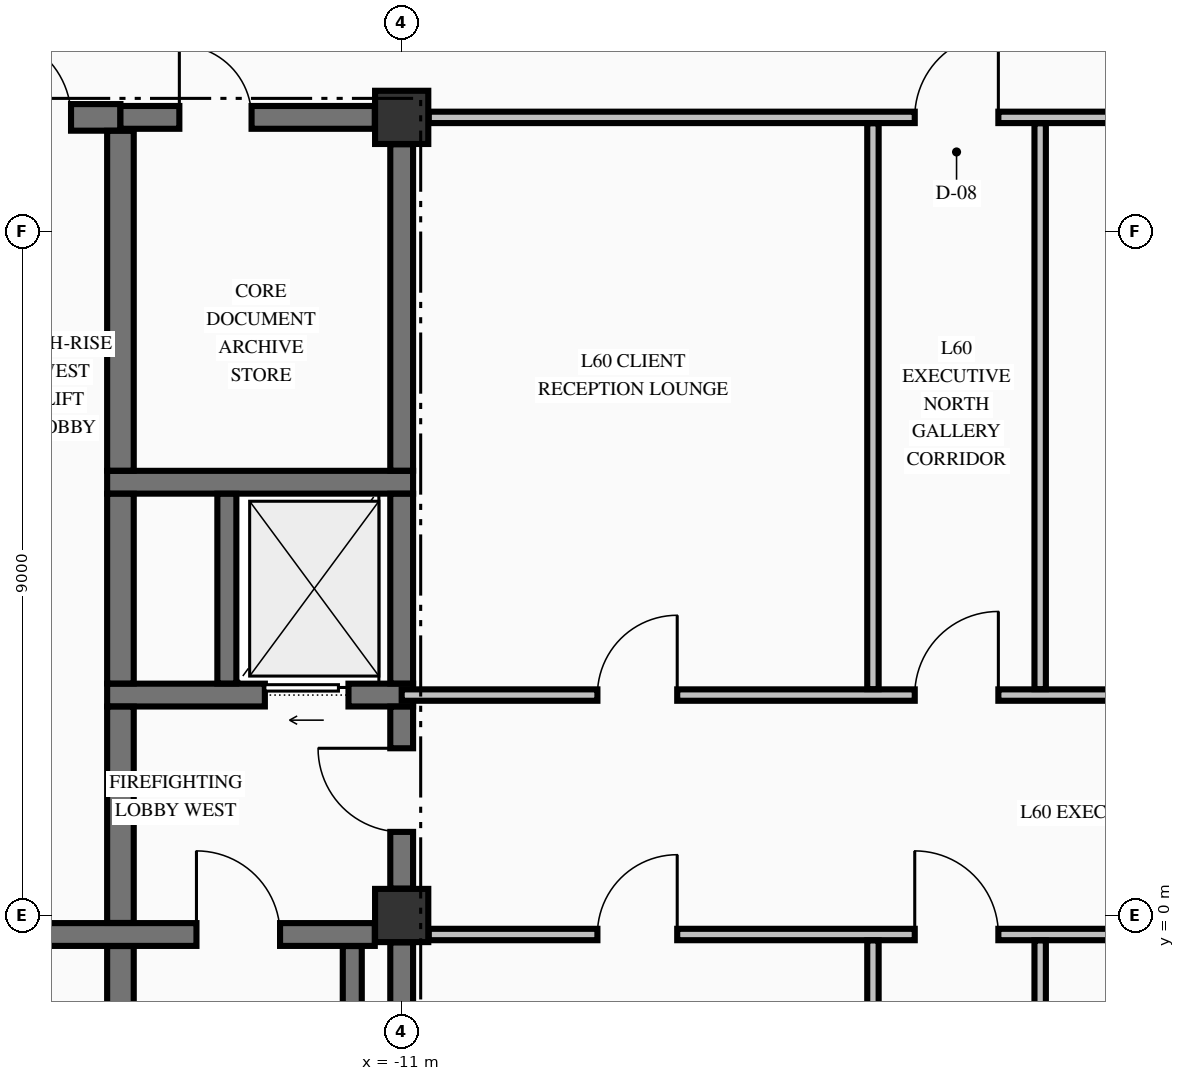
"""IFC4 building model, lengths in metres.
Left out: names, types, materials, properties, quantities, classifications, styles, units other than length and angle.
Written with IfcOpenShell. Run it as: python <this file> out.ifc"""

import sys

from ifc_helpers import new_model, si_unit, direction, frame, frame_2d, origin, origin_2d, place, context, subcontext, project, spatial, rectangle, extrude, element, fill, save


model = new_model("IFC4")
c1 = context("Model", 3, precision=1e-05, world=origin(), true_north=direction((0.0, 1.0)))
c2 = subcontext(c1, "Body", "Model", "MODEL_VIEW")
j1 = project(units=[si_unit("LENGTHUNIT", "METRE"), si_unit("PLANEANGLEUNIT", "RADIAN")], contexts=[c1])
p1 = place(None, origin())
s1 = spatial("IfcSite", under=j1, at=p1, CompositionType="ELEMENT")
p2 = place(p1, origin())
s2 = spatial("IfcBuilding", under=s1, at=p2, CompositionType="ELEMENT")
p3 = place(p2, frame((0.0, 0.0, 230.05)))
s3 = spatial("IfcBuildingStorey", under=s2, at=p3, CompositionType="ELEMENT", Elevation=230.05)
for number, where, z_axis, x_axis in (
    (1, (-11.0, 0.0, -0.25), (0.0, 0.0, 1.0), (1.0, 0.0, 0.0)),
    (2, (-11.0, 10.5, -0.25), (0.0, 0.0, 1.0), (1.0, 0.0, 0.0)),
):
    element("IfcColumn", number, at=place(p3, frame(where, z_axis=z_axis, x_axis=x_axis)), inside=s3, PredefinedType="COLUMN", context=c2, shape_type="SweptSolid", body=[
        extrude(rectangle(XDim=0.7, YDim=0.7, at=origin_2d()), origin(), (0.0, 0.0, 1.0), 3.23),
    ])
p4 = place(p3, frame((-20.571, -0.25, 0.0), z_axis=(0.0, 0.0, 1.0), x_axis=(1.0, 0.0, 0.0)))
e3 = element("IfcWall", 3, at=p4, inside=s3, PredefinedType="SHEAR", context=c2, shape_type="SweptSolid", body=[
    extrude(rectangle(XDim=9.217, YDim=0.3, at=frame_2d((4.608, 0.0))), origin(), (0.0, 0.0, 1.0), 2.98),
])
p5 = place(p4, frame((6.871, 0.0, 0.0)))
e4 = element("IfcOpeningElement", 4, at=p5, cuts=e3, PredefinedType="OPENING", context=c2, shape_type="SweptSolid", body=[
    extrude(rectangle(XDim=1.1, YDim=2.15, at=frame_2d((0.55, 1.075))), frame((0.0, 0.16, 0.0), z_axis=(0.0, -1.0, 0.0), x_axis=(1.0, 0.0, 0.0)), (0.0, 0.0, 1.0), 0.32),
])
p6 = place(p3, frame((-14.875, 2.9, 0.0), z_axis=(0.0, 0.0, 1.0), x_axis=(1.0, 0.0, 0.0)))
e5 = element("IfcWall", 5, at=p6, inside=s3, PredefinedType="SHEAR", context=c2, shape_type="SweptSolid", body=[
    extrude(rectangle(XDim=4.025, YDim=0.3, at=frame_2d((2.012, 0.0))), origin(), (0.0, 0.0, 1.0), 2.98),
])
p7 = place(p6, frame((2.075, 0.0, 0.0)))
e6 = element("IfcOpeningElement", 6, at=p7, cuts=e5, PredefinedType="OPENING", context=c2, shape_type="SweptSolid", body=[
    extrude(rectangle(XDim=1.1, YDim=2.2, at=frame_2d((0.55, 1.1))), frame((0.0, 0.16, 0.0), z_axis=(0.0, -1.0, 0.0), x_axis=(1.0, 0.0, 0.0)), (0.0, 0.0, 1.0), 0.32),
])
p8 = place(p3, frame((-14.875, 5.7, 0.0), z_axis=(0.0, 0.0, 1.0), x_axis=(1.0, 0.0, 0.0)))
e7 = element("IfcWall", 7, at=p8, inside=s3, PredefinedType="SHEAR", context=c2, shape_type="SweptSolid", body=[
    extrude(rectangle(XDim=4.025, YDim=0.3, at=frame_2d((2.012, 0.0))), origin(), (0.0, 0.0, 1.0), 2.98),
])
p9 = place(p3, frame((-19.646, 10.5, 0.0), z_axis=(0.0, 0.0, 1.0), x_axis=(1.0, 0.0, 0.0)))
e8 = element("IfcWall", 8, at=p9, inside=s3, PredefinedType="SHEAR", context=c2, shape_type="SweptSolid", body=[
    extrude(rectangle(XDim=4.946, YDim=0.35, at=frame_2d((2.473, 0.0))), origin(), (0.0, 0.0, 1.0), 2.98),
])
p10 = place(p9, frame((3.196, 0.0, 0.0)))
e9 = element("IfcOpeningElement", 9, at=p10, cuts=e8, PredefinedType="OPENING", context=c2, shape_type="SweptSolid", body=[
    extrude(rectangle(XDim=1.1, YDim=2.15, at=frame_2d((0.55, 1.075))), frame((0.0, 0.185, 0.0), z_axis=(0.0, -1.0, 0.0), x_axis=(1.0, 0.0, 0.0)), (0.0, 0.0, 1.0), 0.37),
])
p11 = place(p3, frame((-14.7, 10.5, 0.0), z_axis=(0.0, 0.0, 1.0), x_axis=(1.0, 0.0, 0.0)))
e10 = element("IfcWall", 10, at=p11, inside=s3, PredefinedType="SHEAR", context=c2, shape_type="SweptSolid", body=[
    extrude(rectangle(XDim=3.346, YDim=0.3, at=frame_2d((1.673, 0.0))), origin(), (0.0, 0.0, 1.0), 2.98),
])
p12 = place(p11, frame((0.775, 0.0, 0.0)))
e11 = element("IfcOpeningElement", 11, at=p12, cuts=e10, PredefinedType="OPENING", context=c2, shape_type="SweptSolid", body=[
    extrude(rectangle(XDim=0.95, YDim=2.15, at=frame_2d((0.475, 1.075))), frame((0.0, 0.16, 0.0), z_axis=(0.0, -1.0, 0.0), x_axis=(1.0, 0.0, 0.0)), (0.0, 0.0, 1.0), 0.32),
])
p13 = place(p3, frame((-10.644, -0.25, 0.0), z_axis=(0.0, 0.0, 1.0), x_axis=(1.0, 0.0, 0.0)))
e12 = element("IfcWall", 12, at=p13, inside=s3, PredefinedType="PARTITIONING", context=c2, shape_type="SweptSolid", body=[
    extrude(rectangle(XDim=21.288, YDim=0.15, at=frame_2d((10.644, 0.0))), origin(), (0.0, 0.0, 1.0), 2.98),
])
p14 = place(p13, frame((6.394, 0.0, 0.0)))
e13 = element("IfcOpeningElement", 13, at=p14, cuts=e12, PredefinedType="OPENING", context=c2, shape_type="SweptSolid", body=[
    extrude(rectangle(XDim=1.1, YDim=2.15, at=frame_2d((0.55, 1.075))), frame((0.0, 0.085, 0.0), z_axis=(0.0, -1.0, 0.0), x_axis=(1.0, 0.0, 0.0)), (0.0, 0.0, 1.0), 0.17),
])
p15 = place(p13, frame((2.219, 0.0, 0.0)))
e14 = element("IfcOpeningElement", 14, at=p15, cuts=e12, PredefinedType="OPENING", context=c2, shape_type="SweptSolid", body=[
    extrude(rectangle(XDim=1.05, YDim=2.15, at=frame_2d((0.525, 1.075))), frame((0.0, 0.085, 0.0), z_axis=(0.0, -1.0, 0.0), x_axis=(1.0, 0.0, 0.0)), (0.0, 0.0, 1.0), 0.17),
])
p16 = place(p13, frame((14.369, 0.0, 0.0)))
e15 = element("IfcOpeningElement", 15, at=p16, cuts=e12, PredefinedType="OPENING", context=c2, shape_type="SweptSolid", body=[
    extrude(rectangle(XDim=0.95, YDim=2.15, at=frame_2d((0.475, 1.075))), frame((0.0, 0.085, 0.0), z_axis=(0.0, -1.0, 0.0), x_axis=(1.0, 0.0, 0.0)), (0.0, 0.0, 1.0), 0.17),
])
p17 = place(p3, frame((-11.0, 2.9, 0.0), z_axis=(0.0, 0.0, 1.0), x_axis=(1.0, 0.0, 0.0)))
e16 = element("IfcWall", 16, at=p17, inside=s3, PredefinedType="PARTITIONING", context=c2, shape_type="SweptSolid", body=[
    extrude(rectangle(XDim=22.0, YDim=0.15, at=frame_2d((11.0, 0.0))), origin(), (0.0, 0.0, 1.0), 2.98),
])
p18 = place(p17, frame((6.75, 0.0, 0.0)))
e17 = element("IfcOpeningElement", 17, at=p18, cuts=e16, PredefinedType="OPENING", context=c2, shape_type="SweptSolid", body=[
    extrude(rectangle(XDim=1.1, YDim=2.15, at=frame_2d((0.55, 1.075))), frame((0.0, 0.085, 0.0), z_axis=(0.0, -1.0, 0.0), x_axis=(1.0, 0.0, 0.0)), (0.0, 0.0, 1.0), 0.17),
])
p19 = place(p17, frame((2.575, 0.0, 0.0)))
e18 = element("IfcOpeningElement", 18, at=p19, cuts=e16, PredefinedType="OPENING", context=c2, shape_type="SweptSolid", body=[
    extrude(rectangle(XDim=1.05, YDim=2.15, at=frame_2d((0.525, 1.075))), frame((0.0, 0.085, 0.0), z_axis=(0.0, -1.0, 0.0), x_axis=(1.0, 0.0, 0.0)), (0.0, 0.0, 1.0), 0.17),
])
p20 = place(p17, frame((14.65, 0.0, 0.0)))
e19 = element("IfcOpeningElement", 19, at=p20, cuts=e16, PredefinedType="OPENING", context=c2, shape_type="SweptSolid", body=[
    extrude(rectangle(XDim=1.1, YDim=2.15, at=frame_2d((0.55, 1.075))), frame((0.0, 0.085, 0.0), z_axis=(0.0, -1.0, 0.0), x_axis=(1.0, 0.0, 0.0)), (0.0, 0.0, 1.0), 0.17),
])
p21 = place(p3, frame((-10.644, 10.5, 0.0), z_axis=(0.0, 0.0, 1.0), x_axis=(1.0, 0.0, 0.0)))
e20 = element("IfcWall", 20, at=p21, inside=s3, PredefinedType="PARTITIONING", context=c2, shape_type="SweptSolid", body=[
    extrude(rectangle(XDim=21.288, YDim=0.15, at=frame_2d((10.644, 0.0))), origin(), (0.0, 0.0, 1.0), 2.98),
])
p22 = place(p21, frame((6.394, 0.0, 0.0)))
e21 = element("IfcOpeningElement", 21, at=p22, cuts=e20, PredefinedType="OPENING", context=c2, shape_type="SweptSolid", body=[
    extrude(rectangle(XDim=1.1, YDim=2.15, at=frame_2d((0.55, 1.075))), frame((0.0, 0.085, 0.0), z_axis=(0.0, -1.0, 0.0), x_axis=(1.0, 0.0, 0.0)), (0.0, 0.0, 1.0), 0.17),
])
p23 = place(p3, frame((-14.7, -9.773, 0.0), z_axis=(0.0, 0.0, 1.0), x_axis=(0.0, 1.0, 0.0)))
e22 = element("IfcWall", 22, at=p23, inside=s3, PredefinedType="SHEAR", context=c2, shape_type="SweptSolid", body=[
    extrude(rectangle(XDim=9.371, YDim=0.35, at=frame_2d((4.686, 0.0))), origin(), (0.0, 0.0, 1.0), 2.98),
])
p24 = place(p3, frame((-14.7, -0.098, 0.0), z_axis=(0.0, 0.0, 1.0), x_axis=(0.0, 1.0, 0.0)))
e23 = element("IfcWall", 23, at=p24, inside=s3, PredefinedType="SHEAR", context=c2, shape_type="SweptSolid", body=[
    extrude(rectangle(XDim=2.846, YDim=0.35, at=frame_2d((1.423, 0.0))), origin(), (0.0, 0.0, 1.0), 2.98),
])
p25 = place(p3, frame((-14.7, 3.052, 0.0), z_axis=(0.0, 0.0, 1.0), x_axis=(0.0, 1.0, 0.0)))
e24 = element("IfcWall", 24, at=p25, inside=s3, PredefinedType="SHEAR", context=c2, shape_type="SweptSolid", body=[
    extrude(rectangle(XDim=2.496, YDim=0.35, at=frame_2d((1.248, 0.0))), origin(), (0.0, 0.0, 1.0), 2.98),
])
p26 = place(p3, frame((-14.7, 5.852, 0.0), z_axis=(0.0, 0.0, 1.0), x_axis=(0.0, 1.0, 0.0)))
e25 = element("IfcWall", 25, at=p26, inside=s3, PredefinedType="SHEAR", context=c2, shape_type="SweptSolid", body=[
    extrude(rectangle(XDim=4.471, YDim=0.35, at=frame_2d((2.235, 0.0))), origin(), (0.0, 0.0, 1.0), 2.98),
])
p27 = place(p3, frame((-13.3, 3.052, 0.0), z_axis=(0.0, 0.0, 1.0), x_axis=(0.0, 1.0, 0.0)))
e26 = element("IfcWall", 26, at=p27, inside=s3, PredefinedType="SOLIDWALL", context=c2, shape_type="SweptSolid", body=[
    extrude(rectangle(XDim=2.496, YDim=0.25, at=frame_2d((1.248, 0.0))), origin(), (0.0, 0.0, 1.0), 2.98),
])
p28 = place(p3, frame((-11.65, -9.798, 0.0), z_axis=(0.0, 0.0, 1.0), x_axis=(0.0, 1.0, 0.0)))
e27 = element("IfcWall", 27, at=p28, inside=s3, PredefinedType="SOLIDWALL", context=c2, shape_type="SweptSolid", body=[
    extrude(rectangle(XDim=9.396, YDim=0.25, at=frame_2d((4.698, 0.0))), origin(), (0.0, 0.0, 1.0), 2.98),
])
p29 = place(p3, frame((-11.0, -9.596, 0.0), z_axis=(0.0, 0.0, 1.0), x_axis=(0.0, 1.0, 0.0)))
e28 = element("IfcWall", 28, at=p29, inside=s3, PredefinedType="SHEAR", context=c2, shape_type="SweptSolid", body=[
    extrude(rectangle(XDim=9.242, YDim=0.3, at=frame_2d((4.621, 0.0))), origin(), (0.0, 0.0, 1.0), 2.98),
])
p30 = place(p3, frame((-11.0, 0.354, 0.0), z_axis=(0.0, 0.0, 1.0), x_axis=(0.0, 1.0, 0.0)))
e29 = element("IfcWall", 29, at=p30, inside=s3, PredefinedType="SHEAR", context=c2, shape_type="SweptSolid", body=[
    extrude(rectangle(XDim=2.394, YDim=0.3, at=frame_2d((1.197, 0.0))), origin(), (0.0, 0.0, 1.0), 2.98),
])
p31 = place(p30, frame((0.746, 0.0, 0.0)))
e30 = element("IfcOpeningElement", 30, at=p31, cuts=e29, PredefinedType="OPENING", context=c2, shape_type="SweptSolid", body=[
    extrude(rectangle(XDim=1.1, YDim=2.15, at=frame_2d((0.55, 1.075))), frame((0.0, 0.16, 0.0), z_axis=(0.0, -1.0, 0.0), x_axis=(1.0, 0.0, 0.0)), (0.0, 0.0, 1.0), 0.32),
])
p32 = place(p3, frame((-11.0, 3.052, 0.0), z_axis=(0.0, 0.0, 1.0), x_axis=(0.0, 1.0, 0.0)))
e31 = element("IfcWall", 31, at=p32, inside=s3, PredefinedType="SHEAR", context=c2, shape_type="SweptSolid", body=[
    extrude(rectangle(XDim=2.496, YDim=0.3, at=frame_2d((1.248, 0.0))), origin(), (0.0, 0.0, 1.0), 2.98),
])
p33 = place(p3, frame((-11.0, 5.852, 0.0), z_axis=(0.0, 0.0, 1.0), x_axis=(0.0, 1.0, 0.0)))
e32 = element("IfcWall", 32, at=p33, inside=s3, PredefinedType="SHEAR", context=c2, shape_type="SweptSolid", body=[
    extrude(rectangle(XDim=4.294, YDim=0.3, at=frame_2d((2.147, 0.0))), origin(), (0.0, 0.0, 1.0), 2.98),
])
p34 = place(p3, frame((-4.8, -9.872, 0.0), z_axis=(0.0, 0.0, 1.0), x_axis=(0.0, 1.0, 0.0)))
e33 = element("IfcWall", 33, at=p34, inside=s3, PredefinedType="PARTITIONING", context=c2, shape_type="SweptSolid", body=[
    extrude(rectangle(XDim=9.544, YDim=0.15, at=frame_2d((4.772, 0.0))), origin(), (0.0, 0.0, 1.0), 2.98),
])
p35 = place(p3, frame((-4.8, 2.978, 0.0), z_axis=(0.0, 0.0, 1.0), x_axis=(0.0, 1.0, 0.0)))
e34 = element("IfcWall", 34, at=p35, inside=s3, PredefinedType="PARTITIONING", context=c2, shape_type="SweptSolid", body=[
    extrude(rectangle(XDim=7.444, YDim=0.15, at=frame_2d((3.722, 0.0))), origin(), (0.0, 0.0, 1.0), 2.98),
])
p36 = place(p3, frame((-2.6, -5.247, 0.0), z_axis=(0.0, 0.0, 1.0), x_axis=(0.0, 1.0, 0.0)))
e35 = element("IfcWall", 35, at=p36, inside=s3, PredefinedType="PARTITIONING", context=c2, shape_type="SweptSolid", body=[
    extrude(rectangle(XDim=4.919, YDim=0.15, at=frame_2d((2.459, 0.0))), origin(), (0.0, 0.0, 1.0), 2.98),
])
p37 = place(p3, frame((-2.6, 2.978, 0.0), z_axis=(0.0, 0.0, 1.0), x_axis=(0.0, 1.0, 0.0)))
e36 = element("IfcWall", 36, at=p37, inside=s3, PredefinedType="PARTITIONING", context=c2, shape_type="SweptSolid", body=[
    extrude(rectangle(XDim=7.444, YDim=0.15, at=frame_2d((3.722, 0.0))), origin(), (0.0, 0.0, 1.0), 2.98),
])
p38 = place(p5, origin())
e37 = element("IfcDoor", 37, at=p38, inside=s3, OperationType="SINGLE_SWING_LEFT", PredefinedType="DOOR", context=c2, shape_type="SweptSolid", body=[
    extrude(rectangle(XDim=1.1, YDim=2.15, at=frame_2d((0.55, 1.075))), frame((0.0, 0.025, 0.0), z_axis=(0.0, -1.0, 0.0), x_axis=(1.0, 0.0, 0.0)), (0.0, 0.0, 1.0), 0.05),
])
fill(e4, e37)
p39 = place(p31, origin())
e38 = element("IfcDoor", 38, at=p39, inside=s3, OperationType="SINGLE_SWING_RIGHT", PredefinedType="DOOR", context=c2, shape_type="SweptSolid", body=[
    extrude(rectangle(XDim=1.1, YDim=2.15, at=frame_2d((0.55, 1.075))), frame((0.0, 0.025, 0.0), z_axis=(0.0, -1.0, 0.0), x_axis=(1.0, 0.0, 0.0)), (0.0, 0.0, 1.0), 0.05),
])
fill(e30, e38)
p40 = place(p7, origin())
e39 = element("IfcDoor", 39, at=p40, inside=s3, OperationType="SLIDING_TO_LEFT", PredefinedType="DOOR", context=c2, shape_type="SweptSolid", body=[
    extrude(rectangle(XDim=1.1, YDim=2.2, at=frame_2d((0.55, 1.1))), frame((0.0, 0.025, 0.0), z_axis=(0.0, -1.0, 0.0), x_axis=(1.0, 0.0, 0.0)), (0.0, 0.0, 1.0), 0.05),
])
fill(e6, e39)
p41 = place(p12, origin())
e40 = element("IfcDoor", 40, at=p41, inside=s3, OperationType="SINGLE_SWING_LEFT", PredefinedType="DOOR", context=c2, shape_type="SweptSolid", body=[
    extrude(rectangle(XDim=0.95, YDim=2.15, at=frame_2d((0.475, 1.075))), frame((0.0, 0.025, 0.0), z_axis=(0.0, -1.0, 0.0), x_axis=(1.0, 0.0, 0.0)), (0.0, 0.0, 1.0), 0.05),
])
fill(e11, e40)
p42 = place(p10, origin())
e41 = element("IfcDoor", 41, at=p42, inside=s3, OperationType="SINGLE_SWING_LEFT", PredefinedType="DOOR", context=c2, shape_type="SweptSolid", body=[
    extrude(rectangle(XDim=1.1, YDim=2.15, at=frame_2d((0.55, 1.075))), frame((0.0, 0.025, 0.0), z_axis=(0.0, -1.0, 0.0), x_axis=(1.0, 0.0, 0.0)), (0.0, 0.0, 1.0), 0.05),
])
fill(e9, e41)
p43 = place(p22, origin())
e42 = element("IfcDoor", 42, at=p43, inside=s3, OperationType="SINGLE_SWING_RIGHT", PredefinedType="DOOR", context=c2, shape_type="SweptSolid", body=[
    extrude(rectangle(XDim=1.1, YDim=2.15, at=frame_2d((0.55, 1.075))), frame((0.0, 0.025, 0.0), z_axis=(0.0, -1.0, 0.0), x_axis=(1.0, 0.0, 0.0)), (0.0, 0.0, 1.0), 0.05),
])
fill(e21, e42)
p44 = place(p18, origin())
e43 = element("IfcDoor", 43, at=p44, inside=s3, OperationType="SINGLE_SWING_RIGHT", PredefinedType="DOOR", context=c2, shape_type="SweptSolid", body=[
    extrude(rectangle(XDim=1.1, YDim=2.15, at=frame_2d((0.55, 1.075))), frame((0.0, 0.025, 0.0), z_axis=(0.0, -1.0, 0.0), x_axis=(1.0, 0.0, 0.0)), (0.0, 0.0, 1.0), 0.05),
])
fill(e17, e43)
p45 = place(p14, origin())
e44 = element("IfcDoor", 44, at=p45, inside=s3, OperationType="SINGLE_SWING_LEFT", PredefinedType="DOOR", context=c2, shape_type="SweptSolid", body=[
    extrude(rectangle(XDim=1.1, YDim=2.15, at=frame_2d((0.55, 1.075))), frame((0.0, 0.025, 0.0), z_axis=(0.0, -1.0, 0.0), x_axis=(1.0, 0.0, 0.0)), (0.0, 0.0, 1.0), 0.05),
])
fill(e13, e44)
p46 = place(p19, origin())
e45 = element("IfcDoor", 45, at=p46, inside=s3, OperationType="SINGLE_SWING_RIGHT", PredefinedType="DOOR", context=c2, shape_type="SweptSolid", body=[
    extrude(rectangle(XDim=1.05, YDim=2.15, at=frame_2d((0.525, 1.075))), frame((0.0, 0.025, 0.0), z_axis=(0.0, -1.0, 0.0), x_axis=(1.0, 0.0, 0.0)), (0.0, 0.0, 1.0), 0.05),
])
fill(e18, e45)
p47 = place(p15, origin())
e46 = element("IfcDoor", 46, at=p47, inside=s3, OperationType="SINGLE_SWING_RIGHT", PredefinedType="DOOR", context=c2, shape_type="SweptSolid", body=[
    extrude(rectangle(XDim=1.05, YDim=2.15, at=frame_2d((0.525, 1.075))), frame((0.0, 0.025, 0.0), z_axis=(0.0, -1.0, 0.0), x_axis=(1.0, 0.0, 0.0)), (0.0, 0.0, 1.0), 0.05),
])
fill(e14, e46)
save(model, sys.argv[1])
